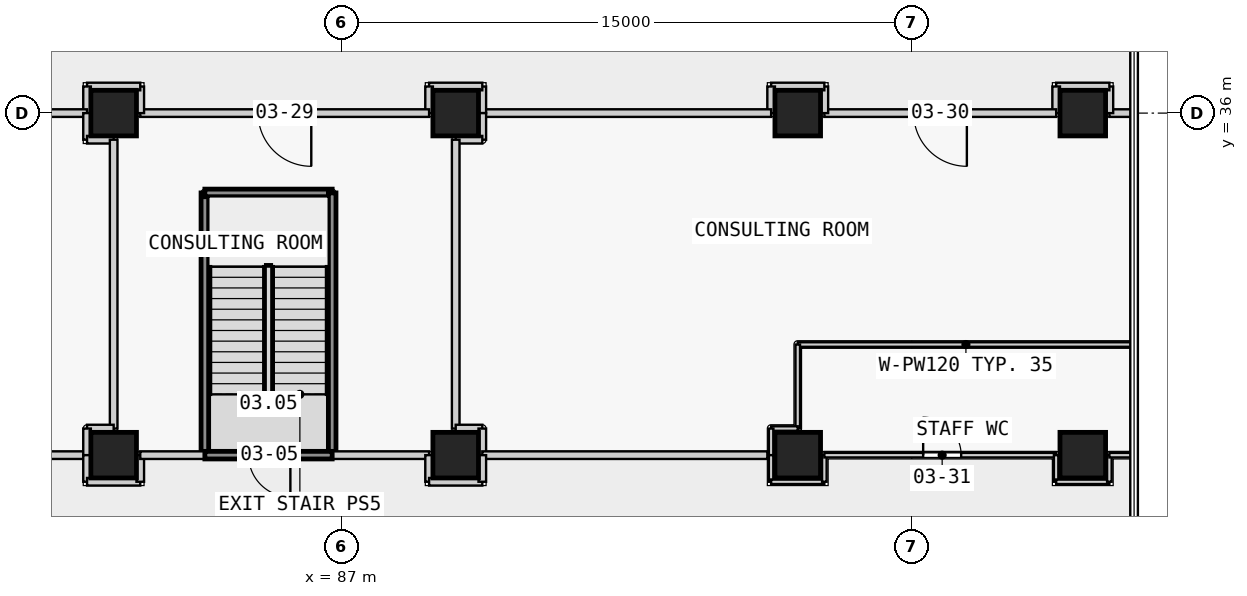
"""IFC4 building model, lengths in metres.
Left out: names, types, materials, properties, quantities, classifications, styles, units other than length and angle.
Written with IfcOpenShell. Run it as: python <this file> out.ifc"""

import sys

from ifc_helpers import new_model, si_unit, direction, frame, frame_2d, origin, origin_2d, place, context, subcontext, project, spatial, rectangle, extrude, element, fill, save


model = new_model("IFC4")
c1 = context("Model", 3, precision=1e-05, world=origin(), true_north=direction((0.0, 1.0)))
c2 = subcontext(c1, "Body", "Model", "MODEL_VIEW")
j1 = project(units=[si_unit("LENGTHUNIT", "METRE"), si_unit("PLANEANGLEUNIT", "RADIAN")], contexts=[c1])
p1 = place(None, origin())
s1 = spatial("IfcSite", under=j1, at=p1, CompositionType="ELEMENT")
p2 = place(p1, origin())
s2 = spatial("IfcBuilding", under=s1, at=p2, CompositionType="ELEMENT")
p3 = place(p2, frame((0.0, 0.0, 17.3)))
s3 = spatial("IfcBuildingStorey", under=s2, at=p3, CompositionType="ELEMENT", Elevation=17.3)
for number, where, z_axis, x_axis in (
    (1, (81.0, 27.0, 0.0), (0.0, 0.0, 1.0), (1.0, 0.0, 0.0)),
    (2, (81.0, 36.0, 0.0), (0.0, 0.0, 1.0), (1.0, 0.0, 0.0)),
    (3, (90.0, 27.0, 0.0), (0.0, 0.0, 1.0), (1.0, 0.0, 0.0)),
    (4, (90.0, 36.0, 0.0), (0.0, 0.0, 1.0), (1.0, 0.0, 0.0)),
    (5, (99.0, 27.0, 0.0), (0.0, 0.0, 1.0), (1.0, 0.0, 0.0)),
    (6, (99.0, 36.0, 0.0), (0.0, 0.0, 1.0), (1.0, 0.0, 0.0)),
    (7, (106.5, 27.0, 0.0), (0.0, 0.0, 1.0), (1.0, 0.0, 0.0)),
    (8, (106.5, 36.0, 0.0), (0.0, 0.0, 1.0), (1.0, 0.0, 0.0)),
):
    element("IfcColumn", number, at=place(p3, frame(where, z_axis=z_axis, x_axis=x_axis)), inside=s3, PredefinedType="COLUMN", context=c2, shape_type="SweptSolid", body=[
        extrude(rectangle(XDim=1.2, YDim=1.2, at=origin_2d()), origin(), (0.0, 0.0, 1.0), 4.5),
    ])
p4 = place(p3, frame((107.85, 36.0, 0.0), z_axis=(0.0, 0.0, 1.0), x_axis=(-1.0, 0.0, 0.0)))
e9 = element("IfcWall", 9, at=p4, inside=s3, PredefinedType="PARTITIONING", context=c2, shape_type="SweptSolid", body=[
    extrude(rectangle(XDim=0.65, YDim=0.2, at=frame_2d((0.325, 0.0))), origin(), (0.0, 0.0, 1.0), 4.15),
])
p5 = place(p3, frame((107.2, 36.0, 0.0), z_axis=(0.0, 0.0, 1.0), x_axis=(0.0, 1.0, 0.0)))
e10 = element("IfcWall", 10, at=p5, inside=s3, PredefinedType="PARTITIONING", context=c2, shape_type="SweptSolid", body=[
    extrude(rectangle(XDim=0.7, YDim=0.2, at=frame_2d((0.35, 0.0))), origin(), (0.0, 0.0, 1.0), 4.15),
])
p6 = place(p3, frame((107.2, 36.7, 0.0), z_axis=(0.0, 0.0, 1.0), x_axis=(-1.0, 0.0, 0.0)))
e11 = element("IfcWall", 11, at=p6, inside=s3, PredefinedType="PARTITIONING", context=c2, shape_type="SweptSolid", body=[
    extrude(rectangle(XDim=1.4, YDim=0.2, at=frame_2d((0.7, 0.0))), origin(), (0.0, 0.0, 1.0), 4.15),
])
p7 = place(p3, frame((105.8, 36.7, 0.0), z_axis=(0.0, 0.0, 1.0), x_axis=(0.0, -1.0, 0.0)))
e12 = element("IfcWall", 12, at=p7, inside=s3, PredefinedType="PARTITIONING", context=c2, shape_type="SweptSolid", body=[
    extrude(rectangle(XDim=0.7, YDim=0.2, at=frame_2d((0.35, 0.0))), origin(), (0.0, 0.0, 1.0), 4.15),
])
p8 = place(p3, frame((105.8, 36.0, 0.0), z_axis=(0.0, 0.0, 1.0), x_axis=(-1.0, 0.0, 0.0)))
e13 = element("IfcWall", 13, at=p8, inside=s3, PredefinedType="PARTITIONING", context=c2, shape_type="SweptSolid", body=[
    extrude(rectangle(XDim=6.1, YDim=0.2, at=frame_2d((3.05, 0.0))), origin(), (0.0, 0.0, 1.0), 4.15),
])
p9 = place(p8, frame((2.35, 0.0, 0.0)))
e14 = element("IfcOpeningElement", 14, at=p9, cuts=e13, PredefinedType="OPENING", context=c2, shape_type="SweptSolid", body=[
    extrude(rectangle(XDim=1.4, YDim=2.1, at=frame_2d((0.7, 1.05))), frame((0.0, 0.11, 0.0), z_axis=(0.0, -1.0, 0.0), x_axis=(1.0, 0.0, 0.0)), (0.0, 0.0, 1.0), 0.22),
])
p10 = place(p3, frame((99.7, 36.0, 0.0), z_axis=(0.0, 0.0, 1.0), x_axis=(0.0, 1.0, 0.0)))
e15 = element("IfcWall", 15, at=p10, inside=s3, PredefinedType="PARTITIONING", context=c2, shape_type="SweptSolid", body=[
    extrude(rectangle(XDim=0.7, YDim=0.2, at=frame_2d((0.35, 0.0))), origin(), (0.0, 0.0, 1.0), 4.15),
])
p11 = place(p3, frame((99.7, 36.7, 0.0), z_axis=(0.0, 0.0, 1.0), x_axis=(-1.0, 0.0, 0.0)))
e16 = element("IfcWall", 16, at=p11, inside=s3, PredefinedType="PARTITIONING", context=c2, shape_type="SweptSolid", body=[
    extrude(rectangle(XDim=1.4, YDim=0.2, at=frame_2d((0.7, 0.0))), origin(), (0.0, 0.0, 1.0), 4.15),
])
p12 = place(p3, frame((98.3, 36.7, 0.0), z_axis=(0.0, 0.0, 1.0), x_axis=(0.0, -1.0, 0.0)))
e17 = element("IfcWall", 17, at=p12, inside=s3, PredefinedType="PARTITIONING", context=c2, shape_type="SweptSolid", body=[
    extrude(rectangle(XDim=0.7, YDim=0.2, at=frame_2d((0.35, 0.0))), origin(), (0.0, 0.0, 1.0), 4.15),
])
p13 = place(p3, frame((98.3, 36.0, 0.0), z_axis=(0.0, 0.0, 1.0), x_axis=(-1.0, 0.0, 0.0)))
e18 = element("IfcWall", 18, at=p13, inside=s3, PredefinedType="PARTITIONING", context=c2, shape_type="SweptSolid", body=[
    extrude(rectangle(XDim=7.6, YDim=0.2, at=frame_2d((3.8, 0.0))), origin(), (0.0, 0.0, 1.0), 4.15),
])
p14 = place(p3, frame((83.4, 27.0, 0.0), z_axis=(0.0, 0.0, 1.0), x_axis=(0.0, 1.0, 0.0)))
e19 = element("IfcWall", 19, at=p14, inside=s3, PredefinedType="PARTITIONING", context=c2, shape_type="SweptSolid", body=[
    extrude(rectangle(XDim=6.9, YDim=0.2, at=frame_2d((3.45, 0.0))), origin(), (0.0, 0.0, 1.0), 4.15),
])
p15 = place(p3, frame((83.4, 33.9, 0.0), z_axis=(0.0, 0.0, 1.0), x_axis=(1.0, 0.0, 0.0)))
e20 = element("IfcWall", 20, at=p15, inside=s3, PredefinedType="PARTITIONING", context=c2, shape_type="SweptSolid", body=[
    extrude(rectangle(XDim=3.35, YDim=0.2, at=frame_2d((1.675, 0.0))), origin(), (0.0, 0.0, 1.0), 4.15),
])
p16 = place(p3, frame((86.75, 33.9, 0.0), z_axis=(0.0, 0.0, 1.0), x_axis=(0.0, -1.0, 0.0)))
e21 = element("IfcWall", 21, at=p16, inside=s3, PredefinedType="PARTITIONING", context=c2, shape_type="SweptSolid", body=[
    extrude(rectangle(XDim=6.9, YDim=0.2, at=frame_2d((3.45, 0.0))), origin(), (0.0, 0.0, 1.0), 4.15),
])
p17 = place(p3, frame((90.7, 36.0, 0.0), z_axis=(0.0, 0.0, 1.0), x_axis=(0.0, 1.0, 0.0)))
e22 = element("IfcWall", 22, at=p17, inside=s3, PredefinedType="PARTITIONING", context=c2, shape_type="SweptSolid", body=[
    extrude(rectangle(XDim=0.7, YDim=0.2, at=frame_2d((0.35, 0.0))), origin(), (0.0, 0.0, 1.0), 4.15),
])
p18 = place(p3, frame((90.7, 36.7, 0.0), z_axis=(0.0, 0.0, 1.0), x_axis=(-1.0, 0.0, 0.0)))
e23 = element("IfcWall", 23, at=p18, inside=s3, PredefinedType="PARTITIONING", context=c2, shape_type="SweptSolid", body=[
    extrude(rectangle(XDim=1.4, YDim=0.2, at=frame_2d((0.7, 0.0))), origin(), (0.0, 0.0, 1.0), 4.15),
])
p19 = place(p3, frame((89.3, 36.7, 0.0), z_axis=(0.0, 0.0, 1.0), x_axis=(0.0, -1.0, 0.0)))
e24 = element("IfcWall", 24, at=p19, inside=s3, PredefinedType="PARTITIONING", context=c2, shape_type="SweptSolid", body=[
    extrude(rectangle(XDim=0.7, YDim=0.2, at=frame_2d((0.35, 0.0))), origin(), (0.0, 0.0, 1.0), 4.15),
])
p20 = place(p3, frame((89.3, 36.0, 0.0), z_axis=(0.0, 0.0, 1.0), x_axis=(-1.0, 0.0, 0.0)))
e25 = element("IfcWall", 25, at=p20, inside=s3, PredefinedType="PARTITIONING", context=c2, shape_type="SweptSolid", body=[
    extrude(rectangle(XDim=7.6, YDim=0.2, at=frame_2d((3.8, 0.0))), origin(), (0.0, 0.0, 1.0), 4.15),
])
p21 = place(p20, frame((3.1, 0.0, 0.0)))
e26 = element("IfcOpeningElement", 26, at=p21, cuts=e25, PredefinedType="OPENING", context=c2, shape_type="SweptSolid", body=[
    extrude(rectangle(XDim=1.4, YDim=2.1, at=frame_2d((0.7, 1.05))), frame((0.0, 0.11, 0.0), z_axis=(0.0, -1.0, 0.0), x_axis=(1.0, 0.0, 0.0)), (0.0, 0.0, 1.0), 0.22),
])
p22 = place(p3, frame((81.7, 36.0, 0.0), z_axis=(0.0, 0.0, 1.0), x_axis=(0.0, 1.0, 0.0)))
e27 = element("IfcWall", 27, at=p22, inside=s3, PredefinedType="PARTITIONING", context=c2, shape_type="SweptSolid", body=[
    extrude(rectangle(XDim=0.7, YDim=0.2, at=frame_2d((0.35, 0.0))), origin(), (0.0, 0.0, 1.0), 4.15),
])
p23 = place(p3, frame((81.7, 36.7, 0.0), z_axis=(0.0, 0.0, 1.0), x_axis=(-1.0, 0.0, 0.0)))
e28 = element("IfcWall", 28, at=p23, inside=s3, PredefinedType="PARTITIONING", context=c2, shape_type="SweptSolid", body=[
    extrude(rectangle(XDim=1.4, YDim=0.2, at=frame_2d((0.7, 0.0))), origin(), (0.0, 0.0, 1.0), 4.15),
])
p24 = place(p3, frame((80.3, 36.7, 0.0), z_axis=(0.0, 0.0, 1.0), x_axis=(0.0, -1.0, 0.0)))
e29 = element("IfcWall", 29, at=p24, inside=s3, PredefinedType="PARTITIONING", context=c2, shape_type="SweptSolid", body=[
    extrude(rectangle(XDim=0.7, YDim=0.2, at=frame_2d((0.35, 0.0))), origin(), (0.0, 0.0, 1.0), 4.15),
])
p25 = place(p3, frame((107.85, 29.911, 0.0), z_axis=(0.0, 0.0, 1.0), x_axis=(-1.0, 0.0, 0.0)))
e30 = element("IfcWall", 30, at=p25, inside=s3, PredefinedType="PARTITIONING", context=c2, shape_type="SweptSolid", body=[
    extrude(rectangle(XDim=8.85, YDim=0.12, at=frame_2d((4.425, 0.0))), origin(), (0.0, 0.0, 1.0), 4.15),
])
p26 = place(p3, frame((99.0, 29.911, 0.0), z_axis=(0.0, 0.0, 1.0), x_axis=(0.0, -1.0, 0.0)))
e31 = element("IfcWall", 31, at=p26, inside=s3, PredefinedType="PARTITIONING", context=c2, shape_type="SweptSolid", body=[
    extrude(rectangle(XDim=2.211, YDim=0.12, at=frame_2d((1.105, 0.0))), origin(), (0.0, 0.0, 1.0), 4.15),
])
for number, where, z_axis, x_axis in (
    (32, (99.0, 27.7, 0.0), (0.0, 0.0, 1.0), (-1.0, 0.0, 0.0)),
    (33, (98.3, 27.7, 0.0), (0.0, 0.0, 1.0), (0.0, -1.0, 0.0)),
    (34, (98.3, 27.0, 0.0), (0.0, 0.0, 1.0), (0.0, -1.0, 0.0)),
):
    element("IfcWall", number, at=place(p3, frame(where, z_axis=z_axis, x_axis=x_axis)), inside=s3, PredefinedType="PARTITIONING", context=c2, shape_type="SweptSolid", body=[
        extrude(rectangle(XDim=0.7, YDim=0.12, at=frame_2d((0.35, 0.0))), origin(), (0.0, 0.0, 1.0), 4.15),
    ])
p27 = place(p3, frame((98.3, 26.3, 0.0), z_axis=(0.0, 0.0, 1.0), x_axis=(1.0, 0.0, 0.0)))
e35 = element("IfcWall", 35, at=p27, inside=s3, PredefinedType="PARTITIONING", context=c2, shape_type="SweptSolid", body=[
    extrude(rectangle(XDim=1.4, YDim=0.12, at=frame_2d((0.7, 0.0))), origin(), (0.0, 0.0, 1.0), 4.15),
])
p28 = place(p3, frame((99.7, 26.3, 0.0), z_axis=(0.0, 0.0, 1.0), x_axis=(0.0, 1.0, 0.0)))
e36 = element("IfcWall", 36, at=p28, inside=s3, PredefinedType="PARTITIONING", context=c2, shape_type="SweptSolid", body=[
    extrude(rectangle(XDim=0.7, YDim=0.12, at=frame_2d((0.35, 0.0))), origin(), (0.0, 0.0, 1.0), 4.15),
])
p29 = place(p3, frame((99.7, 27.0, 0.0), z_axis=(0.0, 0.0, 1.0), x_axis=(1.0, 0.0, 0.0)))
e37 = element("IfcWall", 37, at=p29, inside=s3, PredefinedType="PARTITIONING", context=c2, shape_type="SweptSolid", body=[
    extrude(rectangle(XDim=6.1, YDim=0.12, at=frame_2d((3.05, 0.0))), origin(), (0.0, 0.0, 1.0), 4.15),
])
p30 = place(p29, frame((2.6, 0.0, 0.0)))
e38 = element("IfcOpeningElement", 38, at=p30, cuts=e37, PredefinedType="OPENING", context=c2, shape_type="SweptSolid", body=[
    extrude(rectangle(XDim=1.0, YDim=2.1, at=frame_2d((0.5, 1.05))), frame((0.0, 0.07, 0.0), z_axis=(0.0, -1.0, 0.0), x_axis=(1.0, 0.0, 0.0)), (0.0, 0.0, 1.0), 0.14),
])
p31 = place(p3, frame((105.8, 27.0, 0.0), z_axis=(0.0, 0.0, 1.0), x_axis=(0.0, -1.0, 0.0)))
e39 = element("IfcWall", 39, at=p31, inside=s3, PredefinedType="PARTITIONING", context=c2, shape_type="SweptSolid", body=[
    extrude(rectangle(XDim=0.7, YDim=0.12, at=frame_2d((0.35, 0.0))), origin(), (0.0, 0.0, 1.0), 4.15),
])
p32 = place(p3, frame((105.8, 26.3, 0.0), z_axis=(0.0, 0.0, 1.0), x_axis=(1.0, 0.0, 0.0)))
e40 = element("IfcWall", 40, at=p32, inside=s3, PredefinedType="PARTITIONING", context=c2, shape_type="SweptSolid", body=[
    extrude(rectangle(XDim=1.4, YDim=0.12, at=frame_2d((0.7, 0.0))), origin(), (0.0, 0.0, 1.0), 4.15),
])
p33 = place(p3, frame((107.2, 26.3, 0.0), z_axis=(0.0, 0.0, 1.0), x_axis=(0.0, 1.0, 0.0)))
e41 = element("IfcWall", 41, at=p33, inside=s3, PredefinedType="PARTITIONING", context=c2, shape_type="SweptSolid", body=[
    extrude(rectangle(XDim=0.7, YDim=0.12, at=frame_2d((0.35, 0.0))), origin(), (0.0, 0.0, 1.0), 4.15),
])
p34 = place(p3, frame((107.2, 27.0, 0.0), z_axis=(0.0, 0.0, 1.0), x_axis=(1.0, 0.0, 0.0)))
e42 = element("IfcWall", 42, at=p34, inside=s3, PredefinedType="PARTITIONING", context=c2, shape_type="SweptSolid", body=[
    extrude(rectangle(XDim=0.65, YDim=0.12, at=frame_2d((0.325, 0.0))), origin(), (0.0, 0.0, 1.0), 4.15),
])
p35 = place(p3, frame((80.3, 36.0, 0.0), z_axis=(0.0, 0.0, 1.0), x_axis=(-1.0, 0.0, 0.0)))
e43 = element("IfcWall", 43, at=p35, inside=s3, PredefinedType="PARTITIONING", context=c2, shape_type="SweptSolid", body=[
    extrude(rectangle(XDim=7.6, YDim=0.2, at=frame_2d((3.8, 0.0))), origin(), (0.0, 0.0, 1.0), 4.15),
])
p36 = place(p35, frame((3.1, 0.0, 0.0)))
e44 = element("IfcOpeningElement", 44, at=p36, cuts=e43, PredefinedType="OPENING", context=c2, shape_type="SweptSolid", body=[
    extrude(rectangle(XDim=1.4, YDim=2.1, at=frame_2d((0.7, 1.05))), frame((0.0, 0.11, 0.0), z_axis=(0.0, -1.0, 0.0), x_axis=(1.0, 0.0, 0.0)), (0.0, 0.0, 1.0), 0.22),
])
p37 = place(p3, frame((72.7, 27.0, 0.0), z_axis=(0.0, 0.0, 1.0), x_axis=(1.0, 0.0, 0.0)))
e45 = element("IfcWall", 45, at=p37, inside=s3, PredefinedType="PARTITIONING", context=c2, shape_type="SweptSolid", body=[
    extrude(rectangle(XDim=7.6, YDim=0.2, at=frame_2d((3.8, 0.0))), origin(), (0.0, 0.0, 1.0), 4.15),
])
for number, where, z_axis, x_axis in (
    (46, (80.3, 36.0, 0.0), (0.0, 0.0, 1.0), (0.0, -1.0, 0.0)),
    (47, (80.3, 35.3, 0.0), (0.0, 0.0, 1.0), (1.0, 0.0, 0.0)),
):
    element("IfcWall", number, at=place(p3, frame(where, z_axis=z_axis, x_axis=x_axis)), inside=s3, PredefinedType="PARTITIONING", context=c2, shape_type="SweptSolid", body=[
        extrude(rectangle(XDim=0.7, YDim=0.2, at=frame_2d((0.35, 0.0))), origin(), (0.0, 0.0, 1.0), 4.15),
    ])
p38 = place(p3, frame((81.0, 35.3, 0.0), z_axis=(0.0, 0.0, 1.0), x_axis=(0.0, -1.0, 0.0)))
e48 = element("IfcWall", 48, at=p38, inside=s3, PredefinedType="PARTITIONING", context=c2, shape_type="SweptSolid", body=[
    extrude(rectangle(XDim=7.6, YDim=0.2, at=frame_2d((3.8, 0.0))), origin(), (0.0, 0.0, 1.0), 4.15),
])
for number, where, z_axis, x_axis in (
    (49, (81.0, 27.7, 0.0), (0.0, 0.0, 1.0), (-1.0, 0.0, 0.0)),
    (50, (80.3, 27.7, 0.0), (0.0, 0.0, 1.0), (0.0, -1.0, 0.0)),
    (51, (90.7, 36.0, 0.0), (0.0, 0.0, 1.0), (0.0, -1.0, 0.0)),
    (52, (90.7, 35.3, 0.0), (0.0, 0.0, 1.0), (-1.0, 0.0, 0.0)),
):
    element("IfcWall", number, at=place(p3, frame(where, z_axis=z_axis, x_axis=x_axis)), inside=s3, PredefinedType="PARTITIONING", context=c2, shape_type="SweptSolid", body=[
        extrude(rectangle(XDim=0.7, YDim=0.2, at=frame_2d((0.35, 0.0))), origin(), (0.0, 0.0, 1.0), 4.15),
    ])
p39 = place(p3, frame((90.0, 35.3, 0.0), z_axis=(0.0, 0.0, 1.0), x_axis=(0.0, -1.0, 0.0)))
e53 = element("IfcWall", 53, at=p39, inside=s3, PredefinedType="PARTITIONING", context=c2, shape_type="SweptSolid", body=[
    extrude(rectangle(XDim=7.6, YDim=0.2, at=frame_2d((3.8, 0.0))), origin(), (0.0, 0.0, 1.0), 4.15),
])
for number, where, z_axis, x_axis in (
    (54, (90.0, 27.7, 0.0), (0.0, 0.0, 1.0), (1.0, 0.0, 0.0)),
    (55, (90.7, 27.7, 0.0), (0.0, 0.0, 1.0), (0.0, -1.0, 0.0)),
):
    element("IfcWall", number, at=place(p3, frame(where, z_axis=z_axis, x_axis=x_axis)), inside=s3, PredefinedType="PARTITIONING", context=c2, shape_type="SweptSolid", body=[
        extrude(rectangle(XDim=0.7, YDim=0.2, at=frame_2d((0.35, 0.0))), origin(), (0.0, 0.0, 1.0), 4.15),
    ])
p40 = place(p3, frame((90.7, 27.0, 0.0), z_axis=(0.0, 0.0, 1.0), x_axis=(1.0, 0.0, 0.0)))
e56 = element("IfcWall", 56, at=p40, inside=s3, PredefinedType="PARTITIONING", context=c2, shape_type="SweptSolid", body=[
    extrude(rectangle(XDim=7.5, YDim=0.2, at=frame_2d((3.75, 0.0))), origin(), (0.0, 0.0, 1.0), 4.15),
])
p41 = place(p3, frame((86.75, 27.0, 0.0), z_axis=(0.0, 0.0, 1.0), x_axis=(1.0, 0.0, 0.0)))
e57 = element("IfcWall", 57, at=p41, inside=s3, PredefinedType="PARTITIONING", context=c2, shape_type="SweptSolid", body=[
    extrude(rectangle(XDim=2.55, YDim=0.2, at=frame_2d((1.275, 0.0))), origin(), (0.0, 0.0, 1.0), 4.15),
])
p42 = place(p3, frame((89.3, 27.0, 0.0), z_axis=(0.0, 0.0, 1.0), x_axis=(0.0, -1.0, 0.0)))
e58 = element("IfcWall", 58, at=p42, inside=s3, PredefinedType="PARTITIONING", context=c2, shape_type="SweptSolid", body=[
    extrude(rectangle(XDim=0.7, YDim=0.2, at=frame_2d((0.35, 0.0))), origin(), (0.0, 0.0, 1.0), 4.15),
])
p43 = place(p3, frame((89.3, 26.3, 0.0), z_axis=(0.0, 0.0, 1.0), x_axis=(1.0, 0.0, 0.0)))
e59 = element("IfcWall", 59, at=p43, inside=s3, PredefinedType="PARTITIONING", context=c2, shape_type="SweptSolid", body=[
    extrude(rectangle(XDim=1.4, YDim=0.2, at=frame_2d((0.7, 0.0))), origin(), (0.0, 0.0, 1.0), 4.15),
])
for number, where, z_axis, x_axis in (
    (60, (90.7, 26.3, 0.0), (0.0, 0.0, 1.0), (0.0, 1.0, 0.0)),
    (61, (80.3, 27.0, 0.0), (0.0, 0.0, 1.0), (0.0, -1.0, 0.0)),
):
    element("IfcWall", number, at=place(p3, frame(where, z_axis=z_axis, x_axis=x_axis)), inside=s3, PredefinedType="PARTITIONING", context=c2, shape_type="SweptSolid", body=[
        extrude(rectangle(XDim=0.7, YDim=0.2, at=frame_2d((0.35, 0.0))), origin(), (0.0, 0.0, 1.0), 4.15),
    ])
p44 = place(p3, frame((80.3, 26.3, 0.0), z_axis=(0.0, 0.0, 1.0), x_axis=(1.0, 0.0, 0.0)))
e62 = element("IfcWall", 62, at=p44, inside=s3, PredefinedType="PARTITIONING", context=c2, shape_type="SweptSolid", body=[
    extrude(rectangle(XDim=1.4, YDim=0.2, at=frame_2d((0.7, 0.0))), origin(), (0.0, 0.0, 1.0), 4.15),
])
p45 = place(p3, frame((81.7, 26.3, 0.0), z_axis=(0.0, 0.0, 1.0), x_axis=(0.0, 1.0, 0.0)))
e63 = element("IfcWall", 63, at=p45, inside=s3, PredefinedType="PARTITIONING", context=c2, shape_type="SweptSolid", body=[
    extrude(rectangle(XDim=0.7, YDim=0.2, at=frame_2d((0.35, 0.0))), origin(), (0.0, 0.0, 1.0), 4.15),
])
p46 = place(p3, frame((81.7, 27.0, 0.0), z_axis=(0.0, 0.0, 1.0), x_axis=(1.0, 0.0, 0.0)))
e64 = element("IfcWall", 64, at=p46, inside=s3, PredefinedType="PARTITIONING", context=c2, shape_type="SweptSolid", body=[
    extrude(rectangle(XDim=1.7, YDim=0.2, at=frame_2d((0.85, 0.0))), origin(), (0.0, 0.0, 1.0), 4.15),
])
p47 = place(p3, frame((86.75, 27.0, 0.0), z_axis=(0.0, 0.0, 1.0), x_axis=(-1.0, 0.0, 0.0)))
e65 = element("IfcWall", 65, at=p47, inside=s3, PredefinedType="PARTITIONING", context=c2, shape_type="SweptSolid", body=[
    extrude(rectangle(XDim=3.35, YDim=0.2, at=frame_2d((1.675, 0.0))), origin(), (0.0, 0.0, 1.0), 4.15),
])
p48 = place(p47, frame((1.1, 0.0, 0.0)))
e66 = element("IfcOpeningElement", 66, at=p48, cuts=e65, PredefinedType="OPENING", context=c2, shape_type="SweptSolid", body=[
    extrude(rectangle(XDim=1.1, YDim=2.1, at=frame_2d((0.55, 1.05))), frame((0.0, 0.11, 0.0), z_axis=(0.0, -1.0, 0.0), x_axis=(1.0, 0.0, 0.0)), (0.0, 0.0, 1.0), 0.22),
])
p49 = place(p48, origin())
e67 = element("IfcDoor", 67, at=p49, inside=s3, OperationType="SINGLE_SWING_LEFT", PredefinedType="DOOR", context=c2, shape_type="SweptSolid", body=[
    extrude(rectangle(XDim=1.1, YDim=2.1, at=frame_2d((0.55, 1.05))), frame((0.0, 0.025, 0.0), z_axis=(0.0, -1.0, 0.0), x_axis=(1.0, 0.0, 0.0)), (0.0, 0.0, 1.0), 0.05),
])
fill(e66, e67)
p50 = place(p21, origin())
e68 = element("IfcDoor", 68, at=p50, inside=s3, OperationType="SINGLE_SWING_LEFT", PredefinedType="DOOR", context=c2, shape_type="SweptSolid", body=[
    extrude(rectangle(XDim=1.4, YDim=2.1, at=frame_2d((0.7, 1.05))), frame((0.0, 0.025, 0.0), z_axis=(0.0, -1.0, 0.0), x_axis=(1.0, 0.0, 0.0)), (0.0, 0.0, 1.0), 0.05),
])
fill(e26, e68)
p51 = place(p9, origin())
e69 = element("IfcDoor", 69, at=p51, inside=s3, OperationType="SINGLE_SWING_LEFT", PredefinedType="DOOR", context=c2, shape_type="SweptSolid", body=[
    extrude(rectangle(XDim=1.4, YDim=2.1, at=frame_2d((0.7, 1.05))), frame((0.0, 0.025, 0.0), z_axis=(0.0, -1.0, 0.0), x_axis=(1.0, 0.0, 0.0)), (0.0, 0.0, 1.0), 0.05),
])
fill(e14, e69)
p52 = place(p30, origin())
e70 = element("IfcDoor", 70, at=p52, inside=s3, OperationType="SINGLE_SWING_LEFT", PredefinedType="DOOR", context=c2, shape_type="SweptSolid", body=[
    extrude(rectangle(XDim=1.0, YDim=2.1, at=frame_2d((0.5, 1.05))), frame((0.0, 0.025, 0.0), z_axis=(0.0, -1.0, 0.0), x_axis=(1.0, 0.0, 0.0)), (0.0, 0.0, 1.0), 0.05),
])
fill(e38, e70)
save(model, sys.argv[1])
